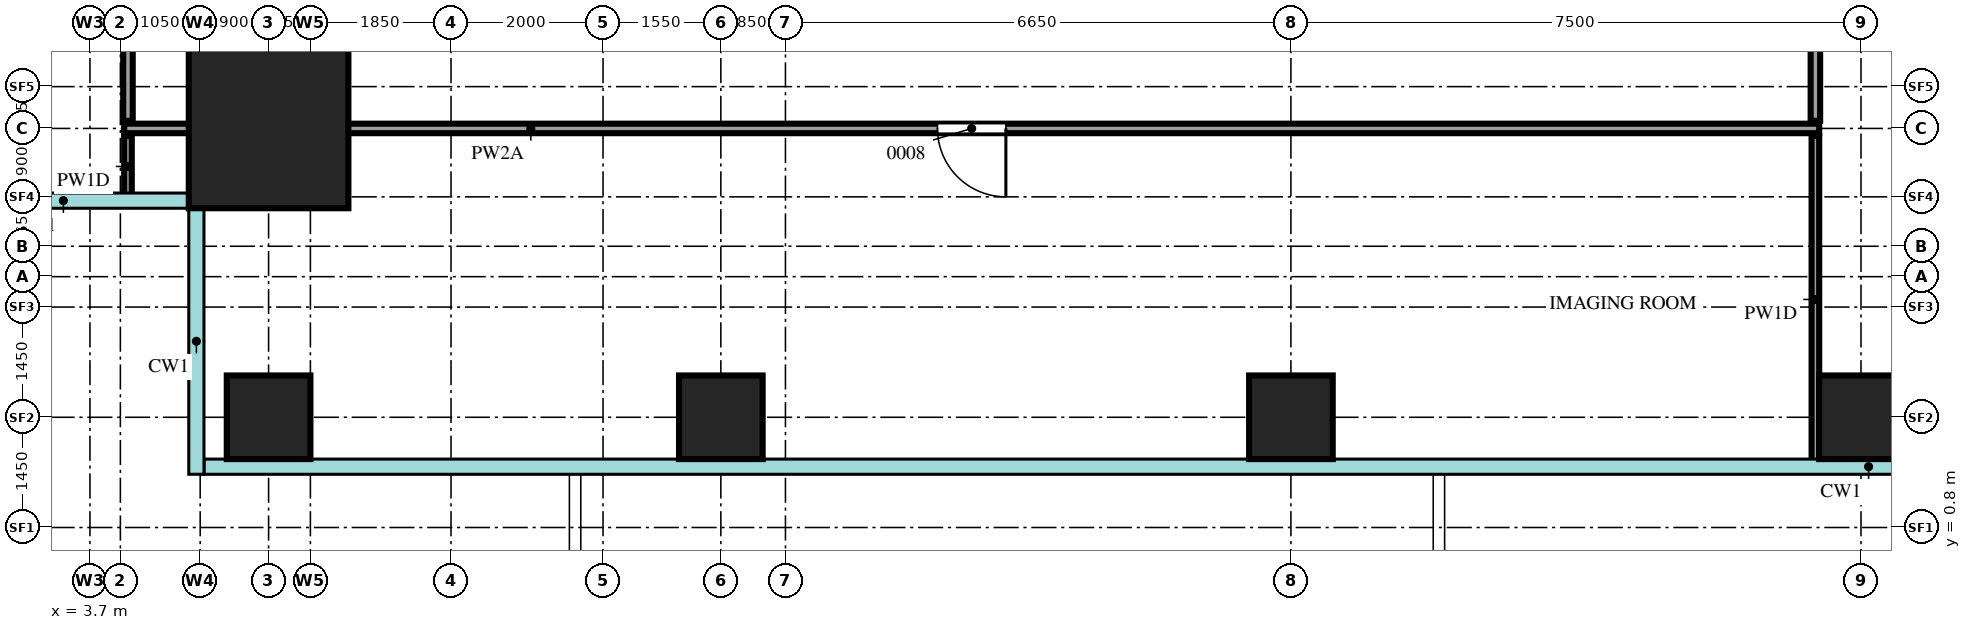
"""IFC4 building model, lengths in metres.
Left out: names, types, materials, properties, quantities, classifications, styles, units other than length and angle.
Written with IfcOpenShell. Run it as: python <this file> out.ifc"""

import sys

from ifc_helpers import new_model, si_unit, direction, frame, frame_2d, origin, origin_2d, place, context, subcontext, project, spatial, rectangle, extrude, source, transform, mapped, element, fill, save


model = new_model("IFC4")
c1 = context("Model", 3, precision=1e-05, world=origin(), true_north=direction((0.0, 1.0)))
c2 = subcontext(c1, "Body", "Model", "MODEL_VIEW")
j1 = project(units=[si_unit("LENGTHUNIT", "METRE"), si_unit("PLANEANGLEUNIT", "RADIAN")], contexts=[c1])
p1 = place(None, origin())
s1 = spatial("IfcSite", under=j1, at=p1, CompositionType="ELEMENT")
p2 = place(p1, origin())
s2 = spatial("IfcBuilding", under=s1, at=p2, CompositionType="ELEMENT")
p3 = place(p2, frame((0.0, 0.0, 136.7)))
s3 = spatial("IfcBuildingStorey", under=s2, at=p3, CompositionType="ELEMENT", Elevation=136.7)
m1 = source(origin(), c2, "Body", "SweptSolid", [
    extrude(rectangle(XDim=2.1, YDim=2.1, at=origin_2d()), origin(), (0.0, 0.0, 1.0), 4.4),
])
p4 = place(p3, frame((6.05, 6.05, 0.0), z_axis=(0.0, 0.0, 1.0), x_axis=(1.0, 0.0, 0.0)))
e1 = element("IfcColumn", 1, at=p4, inside=s3, PredefinedType="COLUMN", context=c2, shape_type="MappedRepresentation", body=[
    mapped(m1, transform((0.0, 0.0, 0.0))),
])
m2 = source(origin(), c2, "Body", "SweptSolid", [
    extrude(rectangle(XDim=1.1, YDim=1.1, at=origin_2d()), origin(), (0.0, 0.0, 1.0), 4.1),
])
for number, where, z_axis, x_axis in (
    (2, (6.05, 2.25, 0.0), (0.0, 0.0, 1.0), (1.0, 0.0, 0.0)),
    (3, (12.0, 2.25, 0.0), (0.0, 0.0, 1.0), (1.0, 0.0, 0.0)),
    (4, (19.5, 2.25, 0.0), (0.0, 0.0, 1.0), (1.0, 0.0, 0.0)),
    (5, (27.0, 2.25, 0.0), (0.0, 0.0, 1.0), (1.0, 0.0, 0.0)),
):
    element("IfcColumn", number, at=place(p3, frame(where, z_axis=z_axis, x_axis=x_axis)), inside=s3, PredefinedType="COLUMN", context=c2, shape_type="MappedRepresentation", body=[
        mapped(m2, transform((0.0, 0.0, 0.0))),
    ])
m3 = source(origin(), c2, "Body", "SweptSolid", [
    extrude(rectangle(XDim=4.3, YDim=0.1, at=frame_2d((2.15, 0.0))), origin(), (0.0, 0.0, 1.0), 4.2),
])
p5 = place(p3, frame((26.4, 1.65, 0.0), z_axis=(0.0, 0.0, 1.0), x_axis=(0.0, 1.0, 0.0)))
e6 = element("IfcWall", 6, at=p5, inside=s3, PredefinedType="PARTITIONING", context=c2, shape_type="MappedRepresentation", body=[
    mapped(m3, transform((0.0, 0.0, 0.0))),
])
m4 = source(origin(), c2, "Body", "SweptSolid", [
    extrude(rectangle(XDim=0.8, YDim=0.1, at=frame_2d((0.4, 0.0))), origin(), (0.0, 0.0, 1.0), 4.2),
])
p6 = place(p3, frame((4.2, 5.15, 0.0), z_axis=(0.0, 0.0, 1.0), x_axis=(0.0, 1.0, 0.0)))
e7 = element("IfcWall", 7, at=p6, inside=s3, PredefinedType="PARTITIONING", context=c2, shape_type="MappedRepresentation", body=[
    mapped(m4, transform((0.0, 0.0, 0.0))),
])
m5 = source(origin(), c2, "Body", "SweptSolid", [
    extrude(rectangle(XDim=22.3, YDim=0.125, at=frame_2d((11.15, 0.0))), origin(), (0.0, 0.0, 1.0), 3.55),
])
p7 = place(p3, frame((4.15, 6.05, 0.0), z_axis=(0.0, 0.0, 1.0), x_axis=(1.0, 0.0, 0.0)))
e8 = element("IfcWall", 8, at=p7, inside=s3, PredefinedType="PARTITIONING", context=c2, shape_type="MappedRepresentation", body=[
    mapped(m5, transform((0.0, 0.0, 0.0))),
])
m6 = source(origin(), c2, "Body", "SweptSolid", [
    extrude(rectangle(XDim=0.9, YDim=2.1, at=frame_2d((0.45, 1.05))), frame((0.0, 0.073, 0.0), z_axis=(0.0, -1.0, 0.0), x_axis=(1.0, 0.0, 0.0)), (0.0, 0.0, 1.0), 0.145),
])
p8 = place(p7, frame((10.7, 0.0, 0.0)))
e9 = element("IfcOpeningElement", 9, at=p8, cuts=e8, PredefinedType="OPENING", context=c2, shape_type="MappedRepresentation", body=[
    mapped(m6, transform((0.0, 0.0, 0.0))),
])
m7 = source(origin(), c2, "Body", "SweptSolid", [
    extrude(rectangle(XDim=21.15, YDim=0.125, at=frame_2d((10.575, 0.0))), origin(), (0.0, 0.0, 1.0), 4.2),
])
p9 = place(p3, frame((4.2, 6.15, 0.0), z_axis=(0.0, 0.0, 1.0), x_axis=(0.0, 1.0, 0.0)))
e10 = element("IfcWall", 10, at=p9, inside=s3, PredefinedType="PARTITIONING", context=c2, shape_type="MappedRepresentation", body=[
    mapped(m7, transform((0.0, 0.0, 0.0))),
])
p10 = place(p9, frame((7.2, 0.0, 0.0)))
e11 = element("IfcOpeningElement", 11, at=p10, cuts=e10, PredefinedType="OPENING", context=c2, shape_type="MappedRepresentation", body=[
    mapped(m6, transform((0.0, 0.0, 0.0))),
])
p11 = place(p9, frame((16.8, 0.0, 0.0)))
e12 = element("IfcOpeningElement", 12, at=p11, cuts=e10, PredefinedType="OPENING", context=c2, shape_type="MappedRepresentation", body=[
    mapped(m6, transform((0.0, 0.0, 0.0))),
])
m8 = source(origin(), c2, "Body", "SweptSolid", [
    extrude(rectangle(XDim=3.95, YDim=0.125, at=frame_2d((1.975, 0.0))), origin(), (0.0, 0.0, 1.0), 4.2),
])
p12 = place(p3, frame((26.4, 6.15, 0.0), z_axis=(0.0, 0.0, 1.0), x_axis=(0.0, 1.0, 0.0)))
e13 = element("IfcWall", 13, at=p12, inside=s3, PredefinedType="PARTITIONING", context=c2, shape_type="MappedRepresentation", body=[
    mapped(m8, transform((0.0, 0.0, 0.0))),
])
m9 = source(origin(), c2, "Body", "SweptSolid", [
    extrude(rectangle(XDim=0.9, YDim=2.1, at=frame_2d((0.45, 1.05))), frame((0.0, 0.025, 0.0), z_axis=(0.0, -1.0, 0.0), x_axis=(1.0, 0.0, 0.0)), (0.0, 0.0, 1.0), 0.05),
])
p13 = place(p8, origin())
e14 = element("IfcDoor", 14, at=p13, inside=s3, OperationType="SINGLE_SWING_RIGHT", PredefinedType="DOOR", context=c2, shape_type="MappedRepresentation", body=[
    mapped(m9, transform((0.0, 0.0, 0.0))),
])
fill(e9, e14)
save(model, sys.argv[1])
